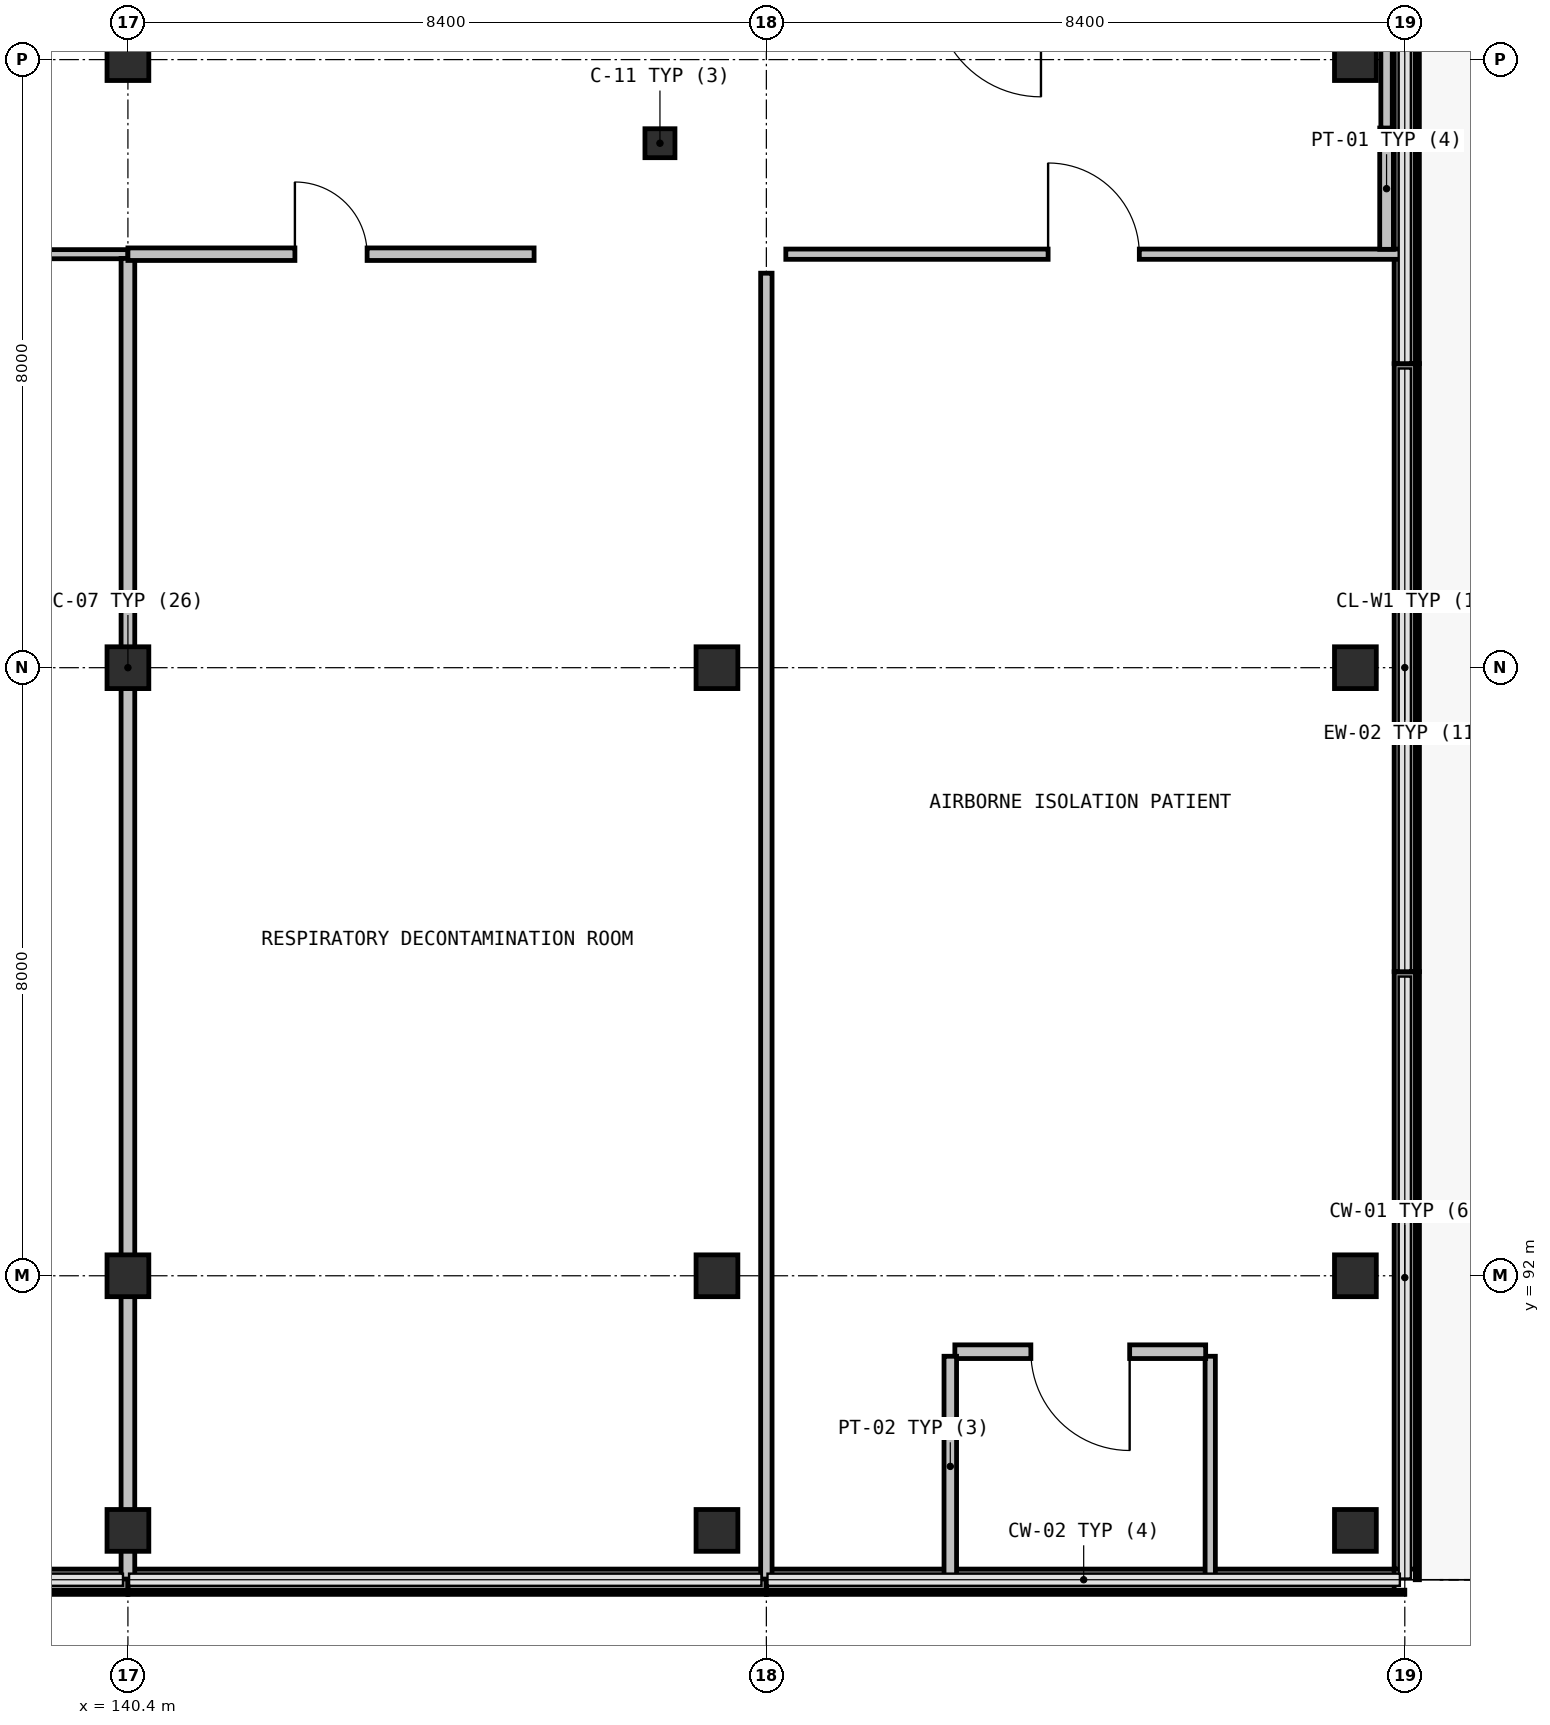
"""IFC4 building model, lengths in metres.
Left out: names, types, materials, properties, quantities, classifications, styles, units other than length and angle.
Written with IfcOpenShell. Run it as: python <this file> out.ifc"""

import sys

from ifc_helpers import new_model, si_unit, direction, frame, frame_2d, origin, origin_2d, place, context, subcontext, project, spatial, rectangle, i_section, extrude, element, fill, save


model = new_model("IFC4")
c1 = context("Model", 3, precision=1e-05, world=origin(), true_north=direction((0.0, 1.0)))
c2 = subcontext(c1, "Body", "Model", "MODEL_VIEW")
j1 = project(units=[si_unit("LENGTHUNIT", "METRE"), si_unit("PLANEANGLEUNIT", "RADIAN")], contexts=[c1])
p1 = place(None, origin())
s1 = spatial("IfcSite", under=j1, at=p1, CompositionType="ELEMENT")
p2 = place(p1, origin())
s2 = spatial("IfcBuilding", under=s1, at=p2, CompositionType="ELEMENT")
p3 = place(p2, frame((0.0, 0.0, 35.4)))
s3 = spatial("IfcBuildingStorey", under=s2, at=p3, CompositionType="ELEMENT", Elevation=35.4)
p4 = place(p3, frame((147.4, 106.9, 0.0), z_axis=(0.0, 0.0, 1.0), x_axis=(1.0, 0.0, 0.0)))
e1 = element("IfcColumn", 1, at=p4, inside=s3, PredefinedType="COLUMN", context=c2, shape_type="SweptSolid", body=[
    extrude(i_section(OverallWidth=0.395, OverallDepth=0.381, WebThickness=0.018, FlangeThickness=0.03, at=origin_2d()), origin(), (0.0, 0.0, 1.0), 4.05),
])
for number, where, z_axis, x_axis in (
    (2, (140.4, 88.65, 0.0), (0.0, 0.0, 1.0), (1.0, 0.0, 0.0)),
    (3, (140.4, 92.0, 0.0), (0.0, 0.0, 1.0), (1.0, 0.0, 0.0)),
    (4, (140.4, 100.0, 0.0), (0.0, 0.0, 1.0), (1.0, 0.0, 0.0)),
    (5, (140.4, 108.0, 0.0), (0.0, 0.0, 1.0), (1.0, 0.0, 0.0)),
    (6, (148.15, 88.65, 0.0), (0.0, 0.0, 1.0), (1.0, 0.0, 0.0)),
    (7, (148.15, 92.0, 0.0), (0.0, 0.0, 1.0), (1.0, 0.0, 0.0)),
    (8, (148.15, 100.0, 0.0), (0.0, 0.0, 1.0), (1.0, 0.0, 0.0)),
    (9, (156.55, 88.65, 0.0), (0.0, 0.0, 1.0), (1.0, 0.0, 0.0)),
    (10, (156.55, 92.0, 0.0), (0.0, 0.0, 1.0), (1.0, 0.0, 0.0)),
    (11, (156.55, 100.0, 0.0), (0.0, 0.0, 1.0), (1.0, 0.0, 0.0)),
    (12, (156.55, 108.0, 0.0), (0.0, 0.0, 1.0), (1.0, 0.0, 0.0)),
):
    element("IfcColumn", number, at=place(p3, frame(where, z_axis=z_axis, x_axis=x_axis)), inside=s3, PredefinedType="COLUMN", context=c2, shape_type="SweptSolid", body=[
        extrude(rectangle(XDim=0.55, YDim=0.55, at=origin_2d()), origin(), (0.0, 0.0, 1.0), 3.74),
    ])
p5 = place(p3, frame((157.199, 111.998, 0.0), z_axis=(0.0, 0.0, 1.0), x_axis=(0.000122144863, -0.99999999254, 0.0)))
e13 = element("IfcWall", 13, at=p5, inside=s3, PredefinedType="SOLIDWALL", context=c2, shape_type="SweptSolid", body=[
    extrude(rectangle(XDim=7.995, YDim=0.28, at=frame_2d((3.998, 0.0))), origin(), (0.0, 0.0, 1.0), 0.94),
])
p6 = place(p3, frame((157.2, 103.999, 0.0), z_axis=(0.0, 0.0, 1.0), x_axis=(0.0, -1.0, 0.0)))
e14 = element("IfcWall", 14, at=p6, inside=s3, PredefinedType="SOLIDWALL", context=c2, shape_type="SweptSolid", body=[
    extrude(rectangle(XDim=7.996, YDim=0.28, at=frame_2d((3.998, 0.0))), origin(), (0.0, 0.0, 1.0), 0.94),
])
p7 = place(p3, frame((157.2, 95.999, 0.0), z_axis=(0.0, 0.0, 1.0), x_axis=(0.0, -1.0, 0.0)))
e15 = element("IfcWall", 15, at=p7, inside=s3, PredefinedType="SOLIDWALL", context=c2, shape_type="SweptSolid", body=[
    extrude(rectangle(XDim=7.858, YDim=0.28, at=frame_2d((3.929, 0.0))), origin(), (0.0, 0.0, 1.0), 0.94),
])
p8 = place(p3, frame((157.06, 88.001, 0.0), z_axis=(0.0, 0.0, 1.0), x_axis=(-1.0, 0.0, 0.0)))
e16 = element("IfcWall", 16, at=p8, inside=s3, PredefinedType="SOLIDWALL", context=c2, shape_type="SweptSolid", body=[
    extrude(rectangle(XDim=8.258, YDim=0.28, at=frame_2d((4.129, 0.0))), origin(), (0.0, 0.0, 1.0), 0.94),
])
for number, where, z_axis, x_axis in (
    (17, (148.798, 88.001, 0.0), (0.0, 0.0, 1.0), (-1.0, 0.0, 0.0)),
    (18, (140.398, 88.001, 0.0), (0.0, 0.0, 1.0), (-1.0, 0.0, 0.0)),
):
    element("IfcWall", number, at=place(p3, frame(where, z_axis=z_axis, x_axis=x_axis)), inside=s3, PredefinedType="SOLIDWALL", context=c2, shape_type="SweptSolid", body=[
        extrude(rectangle(XDim=8.396, YDim=0.28, at=frame_2d((4.198, 0.0))), origin(), (0.0, 0.0, 1.0), 0.94),
    ])
p9 = place(p3, frame((132.056, 105.44, 0.0), z_axis=(0.0, 0.0, 1.0), x_axis=(1.0, 0.0, 0.0)))
e19 = element("IfcWall", 19, at=p9, inside=s3, PredefinedType="PARTITIONING", context=c2, shape_type="SweptSolid", body=[
    extrude(rectangle(XDim=8.344, YDim=0.12, at=frame_2d((4.172, 0.0))), origin(), (0.0, 0.0, 1.0), 3.74),
])
p10 = place(p9, frame((3.547, 0.0, 0.0)))
e20 = element("IfcOpeningElement", 20, at=p10, cuts=e19, PredefinedType="OPENING", context=c2, shape_type="SweptSolid", body=[
    extrude(rectangle(XDim=1.25, YDim=2.15, at=frame_2d((0.625, 1.075))), frame((0.0, 0.07, 0.0), z_axis=(0.0, -1.0, 0.0), x_axis=(1.0, 0.0, 0.0)), (0.0, 0.0, 1.0), 0.14),
])
p11 = place(p3, frame((140.4, 105.384, 0.0), z_axis=(0.0, 0.0, 1.0), x_axis=(0.0, -1.0, 0.0)))
e21 = element("IfcWall", 21, at=p11, inside=s3, PredefinedType="PARTITIONING", context=c2, shape_type="SweptSolid", body=[
    extrude(rectangle(XDim=17.374, YDim=0.18, at=frame_2d((8.687, 0.0))), origin(), (0.0, 0.0, 1.0), 3.14),
])
p12 = place(p3, frame((140.4, 105.44, 0.0), z_axis=(0.0, 0.0, 1.0), x_axis=(1.0, 0.0, 0.0)))
e22 = element("IfcWall", 22, at=p12, inside=s3, PredefinedType="PARTITIONING", context=c2, shape_type="SweptSolid", body=[
    extrude(rectangle(XDim=5.344, YDim=0.165, at=frame_2d((2.672, 0.0))), origin(), (0.0, 0.0, 1.0), 3.74),
])
p13 = place(p12, frame((2.197, 0.0, 0.0)))
e23 = element("IfcOpeningElement", 23, at=p13, cuts=e22, PredefinedType="OPENING", context=c2, shape_type="SweptSolid", body=[
    extrude(rectangle(XDim=0.95, YDim=2.1, at=frame_2d((0.475, 1.05))), frame((0.0, 0.093, 0.0), z_axis=(0.0, -1.0, 0.0), x_axis=(1.0, 0.0, 0.0)), (0.0, 0.0, 1.0), 0.185),
])
p14 = place(p3, frame((148.8, 105.19, 0.0), z_axis=(0.0, 0.0, 1.0), x_axis=(0.0, -1.0, 0.0)))
e24 = element("IfcWall", 24, at=p14, inside=s3, PredefinedType="PARTITIONING", context=c2, shape_type="SweptSolid", body=[
    extrude(rectangle(XDim=17.18, YDim=0.15, at=frame_2d((8.59, 0.0))), origin(), (0.0, 0.0, 1.0), 3.74),
])
p15 = place(p3, frame((154.64, 88.043, 0.0), z_axis=(0.0, 0.0, 1.0), x_axis=(0.0, 1.0, 0.0)))
e25 = element("IfcWall", 25, at=p15, inside=s3, PredefinedType="PARTITIONING", context=c2, shape_type="SweptSolid", body=[
    extrude(rectangle(XDim=2.898, YDim=0.135, at=frame_2d((1.449, 0.0))), origin(), (0.0, 0.0, 1.0), 3.74),
])
p16 = place(p3, frame((154.58, 91.001, 0.0), z_axis=(0.0, 0.0, 1.0), x_axis=(-1.0, 0.0, 0.0)))
e26 = element("IfcWall", 26, at=p16, inside=s3, PredefinedType="PARTITIONING", context=c2, shape_type="SweptSolid", body=[
    extrude(rectangle(XDim=3.3, YDim=0.18, at=frame_2d((1.65, 0.0))), origin(), (0.0, 0.0, 1.0), 3.74),
])
p17 = place(p16, frame((1.0, 0.0, 0.0)))
e27 = element("IfcOpeningElement", 27, at=p17, cuts=e26, PredefinedType="OPENING", context=c2, shape_type="SweptSolid", body=[
    extrude(rectangle(XDim=1.3, YDim=2.15, at=frame_2d((0.65, 1.075))), frame((0.0, 0.1, 0.0), z_axis=(0.0, -1.0, 0.0), x_axis=(1.0, 0.0, 0.0)), (0.0, 0.0, 1.0), 0.2),
])
p18 = place(p3, frame((151.22, 90.941, 0.0), z_axis=(0.0, 0.0, 1.0), x_axis=(0.0, -1.0, 0.0)))
e28 = element("IfcWall", 28, at=p18, inside=s3, PredefinedType="PARTITIONING", context=c2, shape_type="SweptSolid", body=[
    extrude(rectangle(XDim=2.898, YDim=0.165, at=frame_2d((1.449, 0.0))), origin(), (0.0, 0.0, 1.0), 3.74),
])
p19 = place(p3, frame((149.056, 105.44, 0.0), z_axis=(0.0, 0.0, 1.0), x_axis=(1.0, 0.0, 0.0)))
e29 = element("IfcWall", 29, at=p19, inside=s3, PredefinedType="PARTITIONING", context=c2, shape_type="SweptSolid", body=[
    extrude(rectangle(XDim=8.102, YDim=0.135, at=frame_2d((4.051, 0.0))), origin(), (0.0, 0.0, 1.0), 3.74),
])
p20 = place(p19, frame((3.451, 0.0, 0.0)))
e30 = element("IfcOpeningElement", 30, at=p20, cuts=e29, PredefinedType="OPENING", context=c2, shape_type="SweptSolid", body=[
    extrude(rectangle(XDim=1.2, YDim=2.15, at=frame_2d((0.6, 1.075))), frame((0.0, 0.077, 0.0), z_axis=(0.0, -1.0, 0.0), x_axis=(1.0, 0.0, 0.0)), (0.0, 0.0, 1.0), 0.155),
])
p21 = place(p3, frame((156.96, 105.504, 0.0), z_axis=(0.0, 0.0, 1.0), x_axis=(0.0, 1.0, 0.0)))
e31 = element("IfcWall", 31, at=p21, inside=s3, PredefinedType="PARTITIONING", context=c2, shape_type="SweptSolid", body=[
    extrude(rectangle(XDim=1.596, YDim=0.18, at=frame_2d((0.798, 0.0))), origin(), (0.0, 0.0, 1.0), 3.74),
])
p22 = place(p3, frame((156.96, 107.1, 0.0), z_axis=(0.0, 0.0, 1.0), x_axis=(0.0, 1.0, 0.0)))
e32 = element("IfcWall", 32, at=p22, inside=s3, PredefinedType="PARTITIONING", context=c2, shape_type="SweptSolid", body=[
    extrude(rectangle(XDim=3.019, YDim=0.15, at=frame_2d((1.509, 0.0))), origin(), (0.0, 0.0, 1.0), 3.74),
])
p23 = place(p13, origin())
e33 = element("IfcDoor", 33, at=p23, inside=s3, OperationType="SINGLE_SWING_LEFT", PredefinedType="DOOR", context=c2, shape_type="SweptSolid", body=[
    extrude(rectangle(XDim=0.95, YDim=2.1, at=frame_2d((0.475, 1.05))), frame((0.0, 0.025, 0.0), z_axis=(0.0, -1.0, 0.0), x_axis=(1.0, 0.0, 0.0)), (0.0, 0.0, 1.0), 0.05),
])
fill(e23, e33)
p24 = place(p20, origin())
e34 = element("IfcDoor", 34, at=p24, inside=s3, OperationType="SINGLE_SWING_RIGHT", PredefinedType="DOOR", context=c2, shape_type="SweptSolid", body=[
    extrude(rectangle(XDim=1.2, YDim=2.15, at=frame_2d((0.6, 1.075))), frame((0.0, 0.025, 0.0), z_axis=(0.0, -1.0, 0.0), x_axis=(1.0, 0.0, 0.0)), (0.0, 0.0, 1.0), 0.05),
])
fill(e30, e34)
p25 = place(p17, origin())
e35 = element("IfcDoor", 35, at=p25, inside=s3, OperationType="SINGLE_SWING_LEFT", PredefinedType="DOOR", context=c2, shape_type="SweptSolid", body=[
    extrude(rectangle(XDim=1.3, YDim=2.15, at=frame_2d((0.65, 1.075))), frame((0.0, 0.025, 0.0), z_axis=(0.0, -1.0, 0.0), x_axis=(1.0, 0.0, 0.0)), (0.0, 0.0, 1.0), 0.05),
])
fill(e27, e35)
save(model, sys.argv[1])
